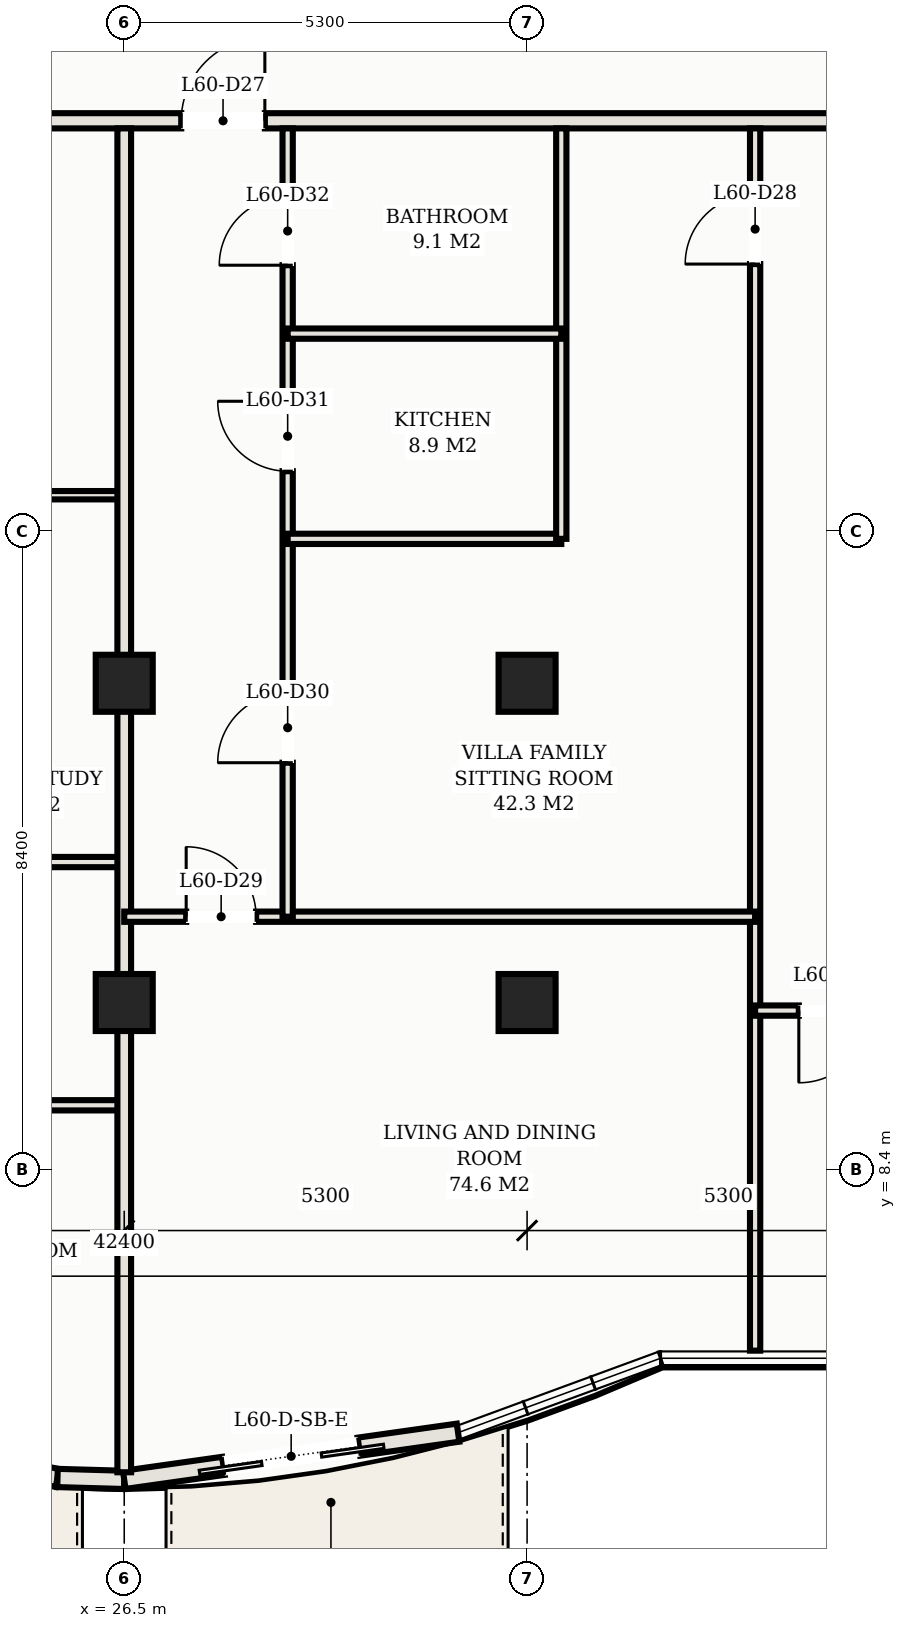
"""IFC4 building model, lengths in metres.
Left out: names, types, materials, properties, quantities, classifications, styles, units other than length and angle.
Written with IfcOpenShell. Run it as: python <this file> out.ifc"""

import sys

from ifc_helpers import new_model, si_unit, direction, frame, frame_2d, origin, origin_2d, place, context, subcontext, project, spatial, rectangle, hollow_rectangle, extrude, element, fill, save


model = new_model("IFC4")
c1 = context("Model", 3, precision=1e-05, world=origin(), true_north=direction((0.0, 1.0)))
c2 = subcontext(c1, "Body", "Model", "MODEL_VIEW")
j1 = project(units=[si_unit("LENGTHUNIT", "METRE"), si_unit("PLANEANGLEUNIT", "RADIAN")], contexts=[c1])
p1 = place(None, origin())
s1 = spatial("IfcSite", under=j1, at=p1, CompositionType="ELEMENT")
p2 = place(p1, origin())
s2 = spatial("IfcBuilding", under=s1, at=p2, CompositionType="ELEMENT")
p3 = place(p2, frame((0.0, 0.0, 219.8)))
s3 = spatial("IfcBuildingStorey", under=s2, at=p3, CompositionType="ELEMENT", Elevation=219.8)
for number, where, z_axis, x_axis in (
    (1, (26.5, 14.8, 0.0), (0.0, 0.0, 1.0), (1.0, 0.0, 0.0)),
    (2, (26.5, 10.6, 0.0), (0.0, 0.0, 1.0), (1.0, 0.0, 0.0)),
    (3, (31.8, 14.8, 0.0), (0.0, 0.0, 1.0), (1.0, 0.0, 0.0)),
    (4, (31.8, 10.6, 0.0), (0.0, 0.0, 1.0), (1.0, 0.0, 0.0)),
):
    element("IfcColumn", number, at=place(p3, frame(where, z_axis=z_axis, x_axis=x_axis)), inside=s3, PredefinedType="COLUMN", context=c2, shape_type="SweptSolid", body=[
        extrude(hollow_rectangle(XDim=0.75, YDim=0.75, WallThickness=0.025, at=origin_2d()), origin(), (0.0, 0.0, 1.0), 3.3),
    ])
p4 = place(p3, frame((21.229, 5.214, 0.0), z_axis=(0.0, 0.0, 1.0), x_axis=(0.980985349685, -0.194081796425, 0.0)))
e5 = element("IfcWall", 5, at=p4, inside=s3, PredefinedType="SOLIDWALL", context=c2, shape_type="SweptSolid", body=[
    extrude(rectangle(XDim=4.478, YDim=0.24, at=frame_2d((2.239, 0.0))), origin(), (0.0, 0.0, 1.0), 3.11),
])
p5 = place(p4, frame((1.381, 0.0, 0.0)))
e6 = element("IfcOpeningElement", 6, at=p5, cuts=e5, PredefinedType="OPENING", context=c2, shape_type="SweptSolid", body=[
    extrude(rectangle(XDim=1.8, YDim=2.2, at=frame_2d((0.9, 1.1))), frame((0.0, 0.13, 0.0), z_axis=(0.0, -1.0, 0.0), x_axis=(1.0, 0.0, 0.0)), (0.0, 0.0, 1.0), 0.26),
])
p6 = place(p3, frame((25.622, 4.345, 0.0), z_axis=(0.0, 0.0, 1.0), x_axis=(0.999597960231, -0.028353446035, 0.0)))
e7 = element("IfcWall", 7, at=p6, inside=s3, PredefinedType="SOLIDWALL", context=c2, shape_type="SweptSolid", body=[
    extrude(rectangle(XDim=0.878, YDim=0.24, at=frame_2d((0.439, 0.0))), origin(), (0.0, 0.0, 1.0), 3.11),
])
p7 = place(p3, frame((26.5, 4.32, 0.0), z_axis=(0.0, 0.0, 1.0), x_axis=(0.990156470874, 0.139964864115, 0.0)))
e8 = element("IfcWall", 8, at=p7, inside=s3, PredefinedType="SOLIDWALL", context=c2, shape_type="SweptSolid", body=[
    extrude(rectangle(XDim=4.436, YDim=0.24, at=frame_2d((2.218, 0.0))), origin(), (0.0, 0.0, 1.0), 3.11),
])
p8 = place(p7, frame((1.318, 0.0, 0.0)))
e9 = element("IfcOpeningElement", 9, at=p8, cuts=e8, PredefinedType="OPENING", context=c2, shape_type="SweptSolid", body=[
    extrude(rectangle(XDim=1.8, YDim=2.2, at=frame_2d((0.9, 1.1))), frame((0.0, 0.13, 0.0), z_axis=(0.0, -1.0, 0.0), x_axis=(1.0, 0.0, 0.0)), (0.0, 0.0, 1.0), 0.26),
])
p9 = place(p3, frame((6.72, 22.2, 0.0), z_axis=(0.0, 0.0, 1.0), x_axis=(1.0, 0.0, 0.0)))
e10 = element("IfcWall", 10, at=p9, inside=s3, PredefinedType="PARTITIONING", context=c2, shape_type="SweptSolid", body=[
    extrude(rectangle(XDim=39.56, YDim=0.2, at=frame_2d((19.78, 0.0))), origin(), (0.0, 0.0, 1.0), 2.43),
])
p10 = place(p9, frame((4.63, 0.0, 0.0)))
e11 = element("IfcOpeningElement", 11, at=p10, cuts=e10, PredefinedType="OPENING", context=c2, shape_type="SweptSolid", body=[
    extrude(rectangle(XDim=1.1, YDim=2.25, at=frame_2d((0.55, 1.125))), frame((0.0, 0.11, 0.0), z_axis=(0.0, -1.0, 0.0), x_axis=(1.0, 0.0, 0.0)), (0.0, 0.0, 1.0), 0.22),
])
p11 = place(p9, frame((20.53, 0.0, 0.0)))
e12 = element("IfcOpeningElement", 12, at=p11, cuts=e10, PredefinedType="OPENING", context=c2, shape_type="SweptSolid", body=[
    extrude(rectangle(XDim=1.1, YDim=2.25, at=frame_2d((0.55, 1.125))), frame((0.0, 0.11, 0.0), z_axis=(0.0, -1.0, 0.0), x_axis=(1.0, 0.0, 0.0)), (0.0, 0.0, 1.0), 0.22),
])
p12 = place(p9, frame((1.435, 0.0, 0.0)))
e13 = element("IfcOpeningElement", 13, at=p12, cuts=e10, PredefinedType="OPENING", context=c2, shape_type="SweptSolid", body=[
    extrude(rectangle(XDim=0.92, YDim=2.15, at=frame_2d((0.46, 1.075))), frame((0.0, 0.11, 0.0), z_axis=(0.0, -1.0, 0.0), x_axis=(1.0, 0.0, 0.0)), (0.0, 0.0, 1.0), 0.22),
])
p13 = place(p9, frame((37.205, 0.0, 0.0)))
e14 = element("IfcOpeningElement", 14, at=p13, cuts=e10, PredefinedType="OPENING", context=c2, shape_type="SweptSolid", body=[
    extrude(rectangle(XDim=0.92, YDim=2.15, at=frame_2d((0.46, 1.075))), frame((0.0, 0.11, 0.0), z_axis=(0.0, -1.0, 0.0), x_axis=(1.0, 0.0, 0.0)), (0.0, 0.0, 1.0), 0.22),
])
p14 = place(p3, frame((21.2, 9.248, 0.0), z_axis=(0.0, 0.0, 1.0), x_axis=(1.0, 0.0, 0.0)))
e15 = element("IfcWall", 15, at=p14, inside=s3, PredefinedType="PARTITIONING", context=c2, shape_type="SweptSolid", body=[
    extrude(rectangle(XDim=5.3, YDim=0.135, at=frame_2d((2.65, 0.0))), origin(), (0.0, 0.0, 1.0), 2.43),
])
p15 = place(p14, frame((0.8, 0.0, 0.0)))
e16 = element("IfcOpeningElement", 16, at=p15, cuts=e15, PredefinedType="OPENING", context=c2, shape_type="SweptSolid", body=[
    extrude(rectangle(XDim=0.95, YDim=2.15, at=frame_2d((0.475, 1.075))), frame((0.0, 0.078, 0.0), z_axis=(0.0, -1.0, 0.0), x_axis=(1.0, 0.0, 0.0)), (0.0, 0.0, 1.0), 0.155),
])
p16 = place(p14, frame((3.275, 0.0, 0.0)))
e17 = element("IfcOpeningElement", 17, at=p16, cuts=e15, PredefinedType="OPENING", context=c2, shape_type="SweptSolid", body=[
    extrude(rectangle(XDim=0.9, YDim=2.15, at=frame_2d((0.45, 1.075))), frame((0.0, 0.078, 0.0), z_axis=(0.0, -1.0, 0.0), x_axis=(1.0, 0.0, 0.0)), (0.0, 0.0, 1.0), 0.155),
])
p17 = place(p3, frame((23.35, 12.448, 0.0), z_axis=(0.0, 0.0, 1.0), x_axis=(1.0, 0.0, 0.0)))
e18 = element("IfcWall", 18, at=p17, inside=s3, PredefinedType="PARTITIONING", context=c2, shape_type="SweptSolid", body=[
    extrude(rectangle(XDim=3.15, YDim=0.135, at=frame_2d((1.575, 0.0))), origin(), (0.0, 0.0, 1.0), 2.43),
])
p18 = place(p3, frame((23.35, 17.274, 0.0), z_axis=(0.0, 0.0, 1.0), x_axis=(1.0, 0.0, 0.0)))
e19 = element("IfcWall", 19, at=p18, inside=s3, PredefinedType="MOVABLE", context=c2, shape_type="SweptSolid", body=[
    extrude(rectangle(XDim=3.15, YDim=0.11, at=frame_2d((1.575, 0.0))), origin(), (0.0, 0.0, 1.0), 2.43),
])
p19 = place(p18, frame((1.115, 0.0, 0.0)))
e20 = element("IfcOpeningElement", 20, at=p19, cuts=e19, PredefinedType="OPENING", context=c2, shape_type="SweptSolid", body=[
    extrude(rectangle(XDim=0.92, YDim=2.15, at=frame_2d((0.46, 1.075))), frame((0.0, 0.065, 0.0), z_axis=(0.0, -1.0, 0.0), x_axis=(1.0, 0.0, 0.0)), (0.0, 0.0, 1.0), 0.13),
])
p20 = place(p3, frame((26.5, 4.42, 0.0), z_axis=(0.0, 0.0, 1.0), x_axis=(0.0, 1.0, 0.0)))
e21 = element("IfcWall", 21, at=p20, inside=s3, PredefinedType="PARTITIONING", context=c2, shape_type="SweptSolid", body=[
    extrude(rectangle(XDim=17.68, YDim=0.18, at=frame_2d((8.84, 0.0))), origin(), (0.0, 0.0, 1.0), 2.43),
])
p21 = place(p3, frame((34.8, 6.02, 0.0), z_axis=(0.0, 0.0, 1.0), x_axis=(0.0, 1.0, 0.0)))
e22 = element("IfcWall", 22, at=p21, inside=s3, PredefinedType="PARTITIONING", context=c2, shape_type="SweptSolid", body=[
    extrude(rectangle(XDim=16.08, YDim=0.135, at=frame_2d((8.04, 0.0))), origin(), (0.0, 0.0, 1.0), 2.43),
])
p22 = place(p21, frame((14.295, 0.0, 0.0)))
e23 = element("IfcOpeningElement", 23, at=p22, cuts=e22, PredefinedType="OPENING", context=c2, shape_type="SweptSolid", body=[
    extrude(rectangle(XDim=0.92, YDim=2.15, at=frame_2d((0.46, 1.075))), frame((0.0, 0.078, 0.0), z_axis=(0.0, -1.0, 0.0), x_axis=(1.0, 0.0, 0.0)), (0.0, 0.0, 1.0), 0.155),
])
p23 = place(p3, frame((26.5, 11.729, 0.0), z_axis=(0.0, 0.0, 1.0), x_axis=(1.0, 0.0, 0.0)))
e24 = element("IfcWall", 24, at=p23, inside=s3, PredefinedType="PARTITIONING", context=c2, shape_type="SweptSolid", body=[
    extrude(rectangle(XDim=8.3, YDim=0.135, at=frame_2d((4.15, 0.0))), origin(), (0.0, 0.0, 1.0), 2.43),
])
p24 = place(p23, frame((0.815, 0.0, 0.0)))
e25 = element("IfcOpeningElement", 25, at=p24, cuts=e24, PredefinedType="OPENING", context=c2, shape_type="SweptSolid", body=[
    extrude(rectangle(XDim=0.92, YDim=2.15, at=frame_2d((0.46, 1.075))), frame((0.0, 0.078, 0.0), z_axis=(0.0, -1.0, 0.0), x_axis=(1.0, 0.0, 0.0)), (0.0, 0.0, 1.0), 0.155),
])
p25 = place(p3, frame((28.65, 11.729, 0.0), z_axis=(0.0, 0.0, 1.0), x_axis=(0.0, 1.0, 0.0)))
e26 = element("IfcWall", 26, at=p25, inside=s3, PredefinedType="PARTITIONING", context=c2, shape_type="SweptSolid", body=[
    extrude(rectangle(XDim=10.371, YDim=0.135, at=frame_2d((5.186, 0.0))), origin(), (0.0, 0.0, 1.0), 2.43),
])
p26 = place(p25, frame((2.026, 0.0, 0.0)))
e27 = element("IfcOpeningElement", 27, at=p26, cuts=e26, PredefinedType="OPENING", context=c2, shape_type="SweptSolid", body=[
    extrude(rectangle(XDim=0.92, YDim=2.15, at=frame_2d((0.46, 1.075))), frame((0.0, 0.078, 0.0), z_axis=(0.0, -1.0, 0.0), x_axis=(1.0, 0.0, 0.0)), (0.0, 0.0, 1.0), 0.155),
])
p27 = place(p25, frame((5.861, 0.0, 0.0)))
e28 = element("IfcOpeningElement", 28, at=p27, cuts=e26, PredefinedType="OPENING", context=c2, shape_type="SweptSolid", body=[
    extrude(rectangle(XDim=0.92, YDim=2.15, at=frame_2d((0.46, 1.075))), frame((0.0, 0.078, 0.0), z_axis=(0.0, -1.0, 0.0), x_axis=(1.0, 0.0, 0.0)), (0.0, 0.0, 1.0), 0.155),
])
p28 = place(p25, frame((8.571, 0.0, 0.0)))
e29 = element("IfcOpeningElement", 29, at=p28, cuts=e26, PredefinedType="OPENING", context=c2, shape_type="SweptSolid", body=[
    extrude(rectangle(XDim=0.9, YDim=2.15, at=frame_2d((0.45, 1.075))), frame((0.0, 0.078, 0.0), z_axis=(0.0, -1.0, 0.0), x_axis=(1.0, 0.0, 0.0)), (0.0, 0.0, 1.0), 0.155),
])
p29 = place(p3, frame((28.65, 16.7, 0.0), z_axis=(0.0, 0.0, 1.0), x_axis=(1.0, 0.0, 0.0)))
e30 = element("IfcWall", 30, at=p29, inside=s3, PredefinedType="PARTITIONING", context=c2, shape_type="SweptSolid", body=[
    extrude(rectangle(XDim=3.6, YDim=0.135, at=frame_2d((1.8, 0.0))), origin(), (0.0, 0.0, 1.0), 2.43),
])
p30 = place(p3, frame((32.25, 16.7, 0.0), z_axis=(0.0, 0.0, 1.0), x_axis=(0.0, 1.0, 0.0)))
e31 = element("IfcWall", 31, at=p30, inside=s3, PredefinedType="PARTITIONING", context=c2, shape_type="SweptSolid", body=[
    extrude(rectangle(XDim=5.4, YDim=0.135, at=frame_2d((2.7, 0.0))), origin(), (0.0, 0.0, 1.0), 2.43),
])
p31 = place(p3, frame((28.65, 19.4, 0.0), z_axis=(0.0, 0.0, 1.0), x_axis=(1.0, 0.0, 0.0)))
e32 = element("IfcWall", 32, at=p31, inside=s3, PredefinedType="PARTITIONING", context=c2, shape_type="SweptSolid", body=[
    extrude(rectangle(XDim=3.6, YDim=0.135, at=frame_2d((1.8, 0.0))), origin(), (0.0, 0.0, 1.0), 2.43),
])
p32 = place(p3, frame((34.8, 10.494, 0.0), z_axis=(0.0, 0.0, 1.0), x_axis=(1.0, 0.0, 0.0)))
e33 = element("IfcWall", 33, at=p32, inside=s3, PredefinedType="PARTITIONING", context=c2, shape_type="SweptSolid", body=[
    extrude(rectangle(XDim=7.6, YDim=0.135, at=frame_2d((3.8, 0.0))), origin(), (0.0, 0.0, 1.0), 2.43),
])
p33 = place(p32, frame((0.575, 0.0, 0.0)))
e34 = element("IfcOpeningElement", 34, at=p33, cuts=e33, PredefinedType="OPENING", context=c2, shape_type="SweptSolid", body=[
    extrude(rectangle(XDim=0.95, YDim=2.15, at=frame_2d((0.475, 1.075))), frame((0.0, 0.078, 0.0), z_axis=(0.0, -1.0, 0.0), x_axis=(1.0, 0.0, 0.0)), (0.0, 0.0, 1.0), 0.155),
])
p34 = place(p32, frame((4.95, 0.0, 0.0)))
e35 = element("IfcOpeningElement", 35, at=p34, cuts=e33, PredefinedType="OPENING", context=c2, shape_type="SweptSolid", body=[
    extrude(rectangle(XDim=0.9, YDim=2.15, at=frame_2d((0.45, 1.075))), frame((0.0, 0.078, 0.0), z_axis=(0.0, -1.0, 0.0), x_axis=(1.0, 0.0, 0.0)), (0.0, 0.0, 1.0), 0.155),
])
p35 = place(p8, frame((1.8, 0.0, 0.0), z_axis=(0.0, 0.0, 1.0), x_axis=(-1.0, 0.0, 0.0)))
e36 = element("IfcDoor", 36, at=p35, inside=s3, OperationType="DOUBLE_DOOR_SLIDING", PredefinedType="DOOR", context=c2, shape_type="SweptSolid", body=[
    extrude(rectangle(XDim=1.8, YDim=2.2, at=frame_2d((0.9, 1.1))), frame((0.0, 0.025, 0.0), z_axis=(0.0, -1.0, 0.0), x_axis=(1.0, 0.0, 0.0)), (0.0, 0.0, 1.0), 0.05),
])
fill(e9, e36)
p36 = place(p11, origin())
e37 = element("IfcDoor", 37, at=p36, inside=s3, OperationType="SINGLE_SWING_RIGHT", PredefinedType="DOOR", context=c2, shape_type="SweptSolid", body=[
    extrude(rectangle(XDim=1.1, YDim=2.25, at=frame_2d((0.55, 1.125))), frame((0.0, 0.025, 0.0), z_axis=(0.0, -1.0, 0.0), x_axis=(1.0, 0.0, 0.0)), (0.0, 0.0, 1.0), 0.05),
])
fill(e12, e37)
p37 = place(p22, origin())
e38 = element("IfcDoor", 38, at=p37, inside=s3, OperationType="SINGLE_SWING_LEFT", PredefinedType="DOOR", context=c2, shape_type="SweptSolid", body=[
    extrude(rectangle(XDim=0.92, YDim=2.15, at=frame_2d((0.46, 1.075))), frame((0.0, 0.025, 0.0), z_axis=(0.0, -1.0, 0.0), x_axis=(1.0, 0.0, 0.0)), (0.0, 0.0, 1.0), 0.05),
])
fill(e23, e38)
p38 = place(p24, origin())
e39 = element("IfcDoor", 39, at=p38, inside=s3, OperationType="SINGLE_SWING_LEFT", PredefinedType="DOOR", context=c2, shape_type="SweptSolid", body=[
    extrude(rectangle(XDim=0.92, YDim=2.15, at=frame_2d((0.46, 1.075))), frame((0.0, 0.025, 0.0), z_axis=(0.0, -1.0, 0.0), x_axis=(1.0, 0.0, 0.0)), (0.0, 0.0, 1.0), 0.05),
])
fill(e25, e39)
p39 = place(p26, origin())
e40 = element("IfcDoor", 40, at=p39, inside=s3, OperationType="SINGLE_SWING_LEFT", PredefinedType="DOOR", context=c2, shape_type="SweptSolid", body=[
    extrude(rectangle(XDim=0.92, YDim=2.15, at=frame_2d((0.46, 1.075))), frame((0.0, 0.025, 0.0), z_axis=(0.0, -1.0, 0.0), x_axis=(1.0, 0.0, 0.0)), (0.0, 0.0, 1.0), 0.05),
])
fill(e27, e40)
p40 = place(p27, origin())
e41 = element("IfcDoor", 41, at=p40, inside=s3, OperationType="SINGLE_SWING_RIGHT", PredefinedType="DOOR", context=c2, shape_type="SweptSolid", body=[
    extrude(rectangle(XDim=0.92, YDim=2.15, at=frame_2d((0.46, 1.075))), frame((0.0, 0.025, 0.0), z_axis=(0.0, -1.0, 0.0), x_axis=(1.0, 0.0, 0.0)), (0.0, 0.0, 1.0), 0.05),
])
fill(e28, e41)
p41 = place(p28, origin())
e42 = element("IfcDoor", 42, at=p41, inside=s3, OperationType="SINGLE_SWING_LEFT", PredefinedType="DOOR", context=c2, shape_type="SweptSolid", body=[
    extrude(rectangle(XDim=0.9, YDim=2.15, at=frame_2d((0.45, 1.075))), frame((0.0, 0.025, 0.0), z_axis=(0.0, -1.0, 0.0), x_axis=(1.0, 0.0, 0.0)), (0.0, 0.0, 1.0), 0.05),
])
fill(e29, e42)
p42 = place(p33, frame((0.95, 0.0, 0.0), z_axis=(0.0, 0.0, 1.0), x_axis=(-1.0, 0.0, 0.0)))
e43 = element("IfcDoor", 43, at=p42, inside=s3, OperationType="SINGLE_SWING_RIGHT", PredefinedType="DOOR", context=c2, shape_type="SweptSolid", body=[
    extrude(rectangle(XDim=0.95, YDim=2.15, at=frame_2d((0.475, 1.075))), frame((0.0, 0.025, 0.0), z_axis=(0.0, -1.0, 0.0), x_axis=(1.0, 0.0, 0.0)), (0.0, 0.0, 1.0), 0.05),
])
fill(e34, e43)
save(model, sys.argv[1])
